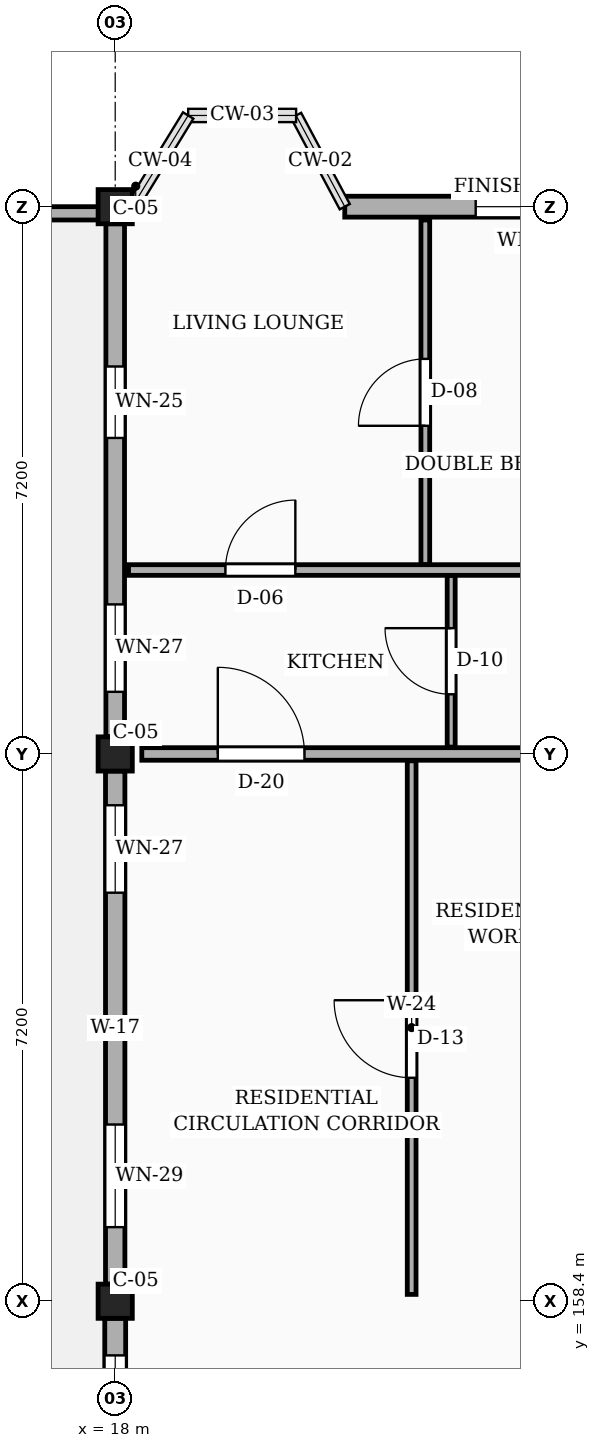
"""IFC4 building model, lengths in metres.
Left out: names, types, materials, properties, quantities, classifications, styles, units other than length and angle.
Written with IfcOpenShell. Run it as: python <this file> out.ifc"""

import sys

from ifc_helpers import new_model, si_unit, direction, frame, frame_2d, origin, origin_2d, place, context, subcontext, project, spatial, rectangle, extrude, element, fill, save


model = new_model("IFC4")
c1 = context("Model", 3, precision=1e-05, world=origin(), true_north=direction((0.0, 1.0)))
c2 = subcontext(c1, "Body", "Model", "MODEL_VIEW")
j1 = project(units=[si_unit("LENGTHUNIT", "METRE"), si_unit("PLANEANGLEUNIT", "RADIAN")], contexts=[c1])
p1 = place(None, origin())
s1 = spatial("IfcSite", under=j1, at=p1, CompositionType="ELEMENT")
p2 = place(p1, origin())
s2 = spatial("IfcBuilding", under=s1, at=p2, CompositionType="ELEMENT")
p3 = place(p2, frame((0.0, 0.0, 36.0)))
s3 = spatial("IfcBuildingStorey", under=s2, at=p3, CompositionType="ELEMENT", Elevation=36.0)
for number, where, z_axis, x_axis in (
    (1, (18.0, 158.4, 0.0), (0.0, 0.0, 1.0), (1.0, 0.0, 0.0)),
    (2, (18.0, 165.6, 0.0), (0.0, 0.0, 1.0), (1.0, 0.0, 0.0)),
    (3, (18.0, 172.8, 0.0), (0.0, 0.0, 1.0), (1.0, 0.0, 0.0)),
):
    element("IfcColumn", number, at=place(p3, frame(where, z_axis=z_axis, x_axis=x_axis)), inside=s3, PredefinedType="COLUMN", context=c2, shape_type="SweptSolid", body=[
        extrude(rectangle(XDim=0.45, YDim=0.45, at=origin_2d()), origin(), (0.0, 0.0, 1.0), 3.15),
    ])
p4 = place(p3, frame((24.975, 172.8, 0.0), z_axis=(0.0, 0.0, 1.0), x_axis=(-1.0, 0.0, 0.0)))
e4 = element("IfcWall", 4, at=p4, inside=s3, PredefinedType="SOLIDWALL", context=c2, shape_type="SweptSolid", body=[
    extrude(rectangle(XDim=3.955, YDim=0.275, at=frame_2d((1.978, 0.0))), origin(), (0.0, 0.0, 1.0), 2.455),
])
p5 = place(p4, frame((0.772, 0.0, 0.78)))
e5 = element("IfcOpeningElement", 5, at=p5, cuts=e4, PredefinedType="OPENING", context=c2, shape_type="SweptSolid", body=[
    extrude(rectangle(XDim=1.46, YDim=1.36, at=frame_2d((0.73, 0.68))), frame((0.0, 0.147, 0.0), z_axis=(0.0, -1.0, 0.0), x_axis=(1.0, 0.0, 0.0)), (0.0, 0.0, 1.0), 0.295),
])
p6 = place(p3, frame((18.0, 172.575, 0.0), z_axis=(0.0, 0.0, 1.0), x_axis=(0.0, -1.0, 0.0)))
e6 = element("IfcWall", 6, at=p6, inside=s3, PredefinedType="SOLIDWALL", context=c2, shape_type="SweptSolid", body=[
    extrude(rectangle(XDim=6.75, YDim=0.245, at=frame_2d((3.375, 0.0))), origin(), (0.0, 0.0, 1.0), 2.455),
])
p7 = place(p6, frame((1.877, 0.0, 0.78)))
e7 = element("IfcOpeningElement", 7, at=p7, cuts=e6, PredefinedType="OPENING", context=c2, shape_type="SweptSolid", body=[
    extrude(rectangle(XDim=0.94, YDim=1.44, at=frame_2d((0.47, 0.72))), frame((0.0, 0.133, 0.0), z_axis=(0.0, -1.0, 0.0), x_axis=(1.0, 0.0, 0.0)), (0.0, 0.0, 1.0), 0.265),
])
p8 = place(p6, frame((5.008, 0.0, 0.78)))
e8 = element("IfcOpeningElement", 8, at=p8, cuts=e6, PredefinedType="OPENING", context=c2, shape_type="SweptSolid", body=[
    extrude(rectangle(XDim=1.15, YDim=1.44, at=frame_2d((0.575, 0.72))), frame((0.0, 0.133, 0.0), z_axis=(0.0, -1.0, 0.0), x_axis=(1.0, 0.0, 0.0)), (0.0, 0.0, 1.0), 0.265),
])
p9 = place(p3, frame((18.0, 165.375, 0.0), z_axis=(0.0, 0.0, 1.0), x_axis=(0.0, -1.0, 0.0)))
e9 = element("IfcWall", 9, at=p9, inside=s3, PredefinedType="SOLIDWALL", context=c2, shape_type="SweptSolid", body=[
    extrude(rectangle(XDim=6.75, YDim=0.255, at=frame_2d((3.375, 0.0))), origin(), (0.0, 0.0, 1.0), 2.455),
])
p10 = place(p9, frame((0.45, 0.0, 0.78)))
e10 = element("IfcOpeningElement", 10, at=p10, cuts=e9, PredefinedType="OPENING", context=c2, shape_type="SweptSolid", body=[
    extrude(rectangle(XDim=1.15, YDim=1.44, at=frame_2d((0.575, 0.72))), frame((0.0, 0.137, 0.0), z_axis=(0.0, -1.0, 0.0), x_axis=(1.0, 0.0, 0.0)), (0.0, 0.0, 1.0), 0.275),
])
p11 = place(p9, frame((4.65, 0.0, 0.78)))
e11 = element("IfcOpeningElement", 11, at=p11, cuts=e9, PredefinedType="OPENING", context=c2, shape_type="SweptSolid", body=[
    extrude(rectangle(XDim=1.35, YDim=1.44, at=frame_2d((0.675, 0.72))), frame((0.0, 0.137, 0.0), z_axis=(0.0, -1.0, 0.0), x_axis=(1.0, 0.0, 0.0)), (0.0, 0.0, 1.0), 0.275),
])
p12 = place(p3, frame((18.0, 158.175, 0.0), z_axis=(0.0, 0.0, 1.0), x_axis=(0.0, -1.0, 0.0)))
e12 = element("IfcWall", 12, at=p12, inside=s3, PredefinedType="SOLIDWALL", context=c2, shape_type="SweptSolid", body=[
    extrude(rectangle(XDim=6.75, YDim=0.275, at=frame_2d((3.375, 0.0))), origin(), (0.0, 0.0, 1.0), 2.455),
])
p13 = place(p12, frame((0.488, 0.0, 0.78)))
e13 = element("IfcOpeningElement", 13, at=p13, cuts=e12, PredefinedType="OPENING", context=c2, shape_type="SweptSolid", body=[
    extrude(rectangle(XDim=1.04, YDim=1.26, at=frame_2d((0.52, 0.63))), frame((0.0, 0.147, 0.0), z_axis=(0.0, -1.0, 0.0), x_axis=(1.0, 0.0, 0.0)), (0.0, 0.0, 1.0), 0.295),
])
p14 = place(p12, frame((2.4, 0.0, 0.78)))
e14 = element("IfcOpeningElement", 14, at=p14, cuts=e12, PredefinedType="OPENING", context=c2, shape_type="SweptSolid", body=[
    extrude(rectangle(XDim=0.85, YDim=1.15, at=frame_2d((0.425, 0.575))), frame((0.0, 0.147, 0.0), z_axis=(0.0, -1.0, 0.0), x_axis=(1.0, 0.0, 0.0)), (0.0, 0.0, 1.0), 0.295),
])
p15 = place(p12, frame((4.692, 0.0, 0.78)))
e15 = element("IfcOpeningElement", 15, at=p15, cuts=e12, PredefinedType="OPENING", context=c2, shape_type="SweptSolid", body=[
    extrude(rectangle(XDim=1.0, YDim=1.15, at=frame_2d((0.5, 0.575))), frame((0.0, 0.147, 0.0), z_axis=(0.0, -1.0, 0.0), x_axis=(1.0, 0.0, 0.0)), (0.0, 0.0, 1.0), 0.295),
])
p16 = place(p3, frame((10.975, 172.712, 0.0), z_axis=(0.0, 0.0, 1.0), x_axis=(1.0, 0.0, 0.0)))
e16 = element("IfcWall", 16, at=p16, inside=s3, PredefinedType="PARAPET", context=c2, shape_type="SweptSolid", body=[
    extrude(rectangle(XDim=7.025, YDim=0.175, at=frame_2d((3.512, 0.0))), origin(), (0.0, 0.0, 1.0), 1.1),
])
p17 = place(p3, frame((18.35, 165.6, 0.0), z_axis=(0.0, 0.0, 1.0), x_axis=(1.0, 0.0, 0.0)))
e17 = element("IfcWall", 17, at=p17, inside=s3, PredefinedType="PARTITIONING", context=c2, shape_type="SweptSolid", body=[
    extrude(rectangle(XDim=6.5, YDim=0.165, at=frame_2d((3.25, 0.0))), origin(), (0.0, 0.0, 1.0), 2.32),
])
p18 = place(p17, frame((1.0, 0.0, 0.0)))
e18 = element("IfcOpeningElement", 18, at=p18, cuts=e17, PredefinedType="OPENING", context=c2, shape_type="SweptSolid", body=[
    extrude(rectangle(XDim=1.14, YDim=2.18, at=frame_2d((0.57, 1.09))), frame((0.0, 0.093, 0.0), z_axis=(0.0, -1.0, 0.0), x_axis=(1.0, 0.0, 0.0)), (0.0, 0.0, 1.0), 0.185),
])
p19 = place(p3, frame((21.9, 158.49, 0.0), z_axis=(0.0, 0.0, 1.0), x_axis=(0.0, 1.0, 0.0)))
e19 = element("IfcWall", 19, at=p19, inside=s3, PredefinedType="PARTITIONING", context=c2, shape_type="SweptSolid", body=[
    extrude(rectangle(XDim=7.02, YDim=0.115, at=frame_2d((3.51, 0.0))), origin(), (0.0, 0.0, 1.0), 2.32),
])
p20 = place(p19, frame((2.85, 0.0, 0.0)))
e20 = element("IfcOpeningElement", 20, at=p20, cuts=e19, PredefinedType="OPENING", context=c2, shape_type="SweptSolid", body=[
    extrude(rectangle(XDim=1.02, YDim=2.15, at=frame_2d((0.51, 1.075))), frame((0.0, 0.067, 0.0), z_axis=(0.0, -1.0, 0.0), x_axis=(1.0, 0.0, 0.0)), (0.0, 0.0, 1.0), 0.135),
])
p21 = place(p3, frame((22.08, 168.09, 0.0), z_axis=(0.0, 0.0, 1.0), x_axis=(0.0, 1.0, 0.0)))
e21 = element("IfcWall", 21, at=p21, inside=s3, PredefinedType="PARTITIONING", context=c2, shape_type="SweptSolid", body=[
    extrude(rectangle(XDim=4.535, YDim=0.115, at=frame_2d((2.268, 0.0))), origin(), (0.0, 0.0, 1.0), 2.32),
])
p22 = place(p21, frame((1.827, 0.0, 0.0)))
e22 = element("IfcOpeningElement", 22, at=p22, cuts=e21, PredefinedType="OPENING", context=c2, shape_type="SweptSolid", body=[
    extrude(rectangle(XDim=0.88, YDim=2.08, at=frame_2d((0.44, 1.04))), frame((0.0, 0.067, 0.0), z_axis=(0.0, -1.0, 0.0), x_axis=(1.0, 0.0, 0.0)), (0.0, 0.0, 1.0), 0.135),
])
p23 = place(p3, frame((22.42, 165.69, 0.0), z_axis=(0.0, 0.0, 1.0), x_axis=(0.0, 1.0, 0.0)))
e23 = element("IfcWall", 23, at=p23, inside=s3, PredefinedType="PARTITIONING", context=c2, shape_type="SweptSolid", body=[
    extrude(rectangle(XDim=2.26, YDim=0.105, at=frame_2d((1.13, 0.0))), origin(), (0.0, 0.0, 1.0), 2.32),
])
p24 = place(p23, frame((0.695, 0.0, 0.0)))
e24 = element("IfcOpeningElement", 24, at=p24, cuts=e23, PredefinedType="OPENING", context=c2, shape_type="SweptSolid", body=[
    extrude(rectangle(XDim=0.87, YDim=2.05, at=frame_2d((0.435, 1.025))), frame((0.0, 0.062, 0.0), z_axis=(0.0, -1.0, 0.0), x_axis=(1.0, 0.0, 0.0)), (0.0, 0.0, 1.0), 0.125),
])
p25 = place(p3, frame((18.175, 168.02, 0.0), z_axis=(0.0, 0.0, 1.0), x_axis=(1.0, 0.0, 0.0)))
e25 = element("IfcWall", 25, at=p25, inside=s3, PredefinedType="PARTITIONING", context=c2, shape_type="SweptSolid", body=[
    extrude(rectangle(XDim=6.885, YDim=0.14, at=frame_2d((3.442, 0.0))), origin(), (0.0, 0.0, 1.0), 2.32),
])
p26 = place(p25, frame((1.275, 0.0, 0.0)))
e26 = element("IfcOpeningElement", 26, at=p26, cuts=e25, PredefinedType="OPENING", context=c2, shape_type="SweptSolid", body=[
    extrude(rectangle(XDim=0.92, YDim=2.1, at=frame_2d((0.46, 1.05))), frame((0.0, 0.08, 0.0), z_axis=(0.0, -1.0, 0.0), x_axis=(1.0, 0.0, 0.0)), (0.0, 0.0, 1.0), 0.16),
])
p27 = place(p5, origin())
e27 = element("IfcWindow", 27, at=p27, inside=s3, PartitioningType="SINGLE_PANEL", PredefinedType="WINDOW", context=c2, shape_type="SweptSolid", body=[
    extrude(rectangle(XDim=1.46, YDim=1.36, at=frame_2d((0.73, 0.68))), frame((0.0, 0.03, 0.0), z_axis=(0.0, -1.0, 0.0), x_axis=(1.0, 0.0, 0.0)), (0.0, 0.0, 1.0), 0.06),
])
fill(e5, e27)
p28 = place(p7, origin())
e28 = element("IfcWindow", 28, at=p28, inside=s3, PartitioningType="SINGLE_PANEL", PredefinedType="WINDOW", context=c2, shape_type="SweptSolid", body=[
    extrude(rectangle(XDim=0.94, YDim=1.44, at=frame_2d((0.47, 0.72))), frame((0.0, 0.03, 0.0), z_axis=(0.0, -1.0, 0.0), x_axis=(1.0, 0.0, 0.0)), (0.0, 0.0, 1.0), 0.06),
])
fill(e7, e28)
p29 = place(p8, origin())
e29 = element("IfcWindow", 29, at=p29, inside=s3, PartitioningType="SINGLE_PANEL", PredefinedType="WINDOW", context=c2, shape_type="SweptSolid", body=[
    extrude(rectangle(XDim=1.15, YDim=1.44, at=frame_2d((0.575, 0.72))), frame((0.0, 0.03, 0.0), z_axis=(0.0, -1.0, 0.0), x_axis=(1.0, 0.0, 0.0)), (0.0, 0.0, 1.0), 0.06),
])
fill(e8, e29)
p30 = place(p10, origin())
e30 = element("IfcWindow", 30, at=p30, inside=s3, PartitioningType="SINGLE_PANEL", PredefinedType="WINDOW", context=c2, shape_type="SweptSolid", body=[
    extrude(rectangle(XDim=1.15, YDim=1.44, at=frame_2d((0.575, 0.72))), frame((0.0, 0.03, 0.0), z_axis=(0.0, -1.0, 0.0), x_axis=(1.0, 0.0, 0.0)), (0.0, 0.0, 1.0), 0.06),
])
fill(e10, e30)
p31 = place(p11, origin())
e31 = element("IfcWindow", 31, at=p31, inside=s3, PartitioningType="SINGLE_PANEL", PredefinedType="WINDOW", context=c2, shape_type="SweptSolid", body=[
    extrude(rectangle(XDim=1.35, YDim=1.44, at=frame_2d((0.675, 0.72))), frame((0.0, 0.03, 0.0), z_axis=(0.0, -1.0, 0.0), x_axis=(1.0, 0.0, 0.0)), (0.0, 0.0, 1.0), 0.06),
])
fill(e11, e31)
p32 = place(p13, origin())
e32 = element("IfcWindow", 32, at=p32, inside=s3, PartitioningType="SINGLE_PANEL", PredefinedType="WINDOW", context=c2, shape_type="SweptSolid", body=[
    extrude(rectangle(XDim=1.04, YDim=1.26, at=frame_2d((0.52, 0.63))), frame((0.0, 0.03, 0.0), z_axis=(0.0, -1.0, 0.0), x_axis=(1.0, 0.0, 0.0)), (0.0, 0.0, 1.0), 0.06),
])
fill(e13, e32)
p33 = place(p18, origin())
e33 = element("IfcDoor", 33, at=p33, inside=s3, OperationType="SINGLE_SWING_LEFT", PredefinedType="DOOR", context=c2, shape_type="SweptSolid", body=[
    extrude(rectangle(XDim=1.14, YDim=2.18, at=frame_2d((0.57, 1.09))), frame((0.0, 0.025, 0.0), z_axis=(0.0, -1.0, 0.0), x_axis=(1.0, 0.0, 0.0)), (0.0, 0.0, 1.0), 0.05),
])
fill(e18, e33)
p34 = place(p20, origin())
e34 = element("IfcDoor", 34, at=p34, inside=s3, OperationType="SINGLE_SWING_RIGHT", PredefinedType="DOOR", context=c2, shape_type="SweptSolid", body=[
    extrude(rectangle(XDim=1.02, YDim=2.15, at=frame_2d((0.51, 1.075))), frame((0.0, 0.025, 0.0), z_axis=(0.0, -1.0, 0.0), x_axis=(1.0, 0.0, 0.0)), (0.0, 0.0, 1.0), 0.05),
])
fill(e20, e34)
p35 = place(p22, origin())
e35 = element("IfcDoor", 35, at=p35, inside=s3, OperationType="SINGLE_SWING_LEFT", PredefinedType="DOOR", context=c2, shape_type="SweptSolid", body=[
    extrude(rectangle(XDim=0.88, YDim=2.08, at=frame_2d((0.44, 1.04))), frame((0.0, 0.025, 0.0), z_axis=(0.0, -1.0, 0.0), x_axis=(1.0, 0.0, 0.0)), (0.0, 0.0, 1.0), 0.05),
])
fill(e22, e35)
p36 = place(p24, origin())
e36 = element("IfcDoor", 36, at=p36, inside=s3, OperationType="SINGLE_SWING_RIGHT", PredefinedType="DOOR", context=c2, shape_type="SweptSolid", body=[
    extrude(rectangle(XDim=0.87, YDim=2.05, at=frame_2d((0.435, 1.025))), frame((0.0, 0.025, 0.0), z_axis=(0.0, -1.0, 0.0), x_axis=(1.0, 0.0, 0.0)), (0.0, 0.0, 1.0), 0.05),
])
fill(e24, e36)
p37 = place(p26, origin())
e37 = element("IfcDoor", 37, at=p37, inside=s3, OperationType="SINGLE_SWING_RIGHT", PredefinedType="DOOR", context=c2, shape_type="SweptSolid", body=[
    extrude(rectangle(XDim=0.92, YDim=2.1, at=frame_2d((0.46, 1.05))), frame((0.0, 0.025, 0.0), z_axis=(0.0, -1.0, 0.0), x_axis=(1.0, 0.0, 0.0)), (0.0, 0.0, 1.0), 0.05),
])
fill(e26, e37)
save(model, sys.argv[1])
